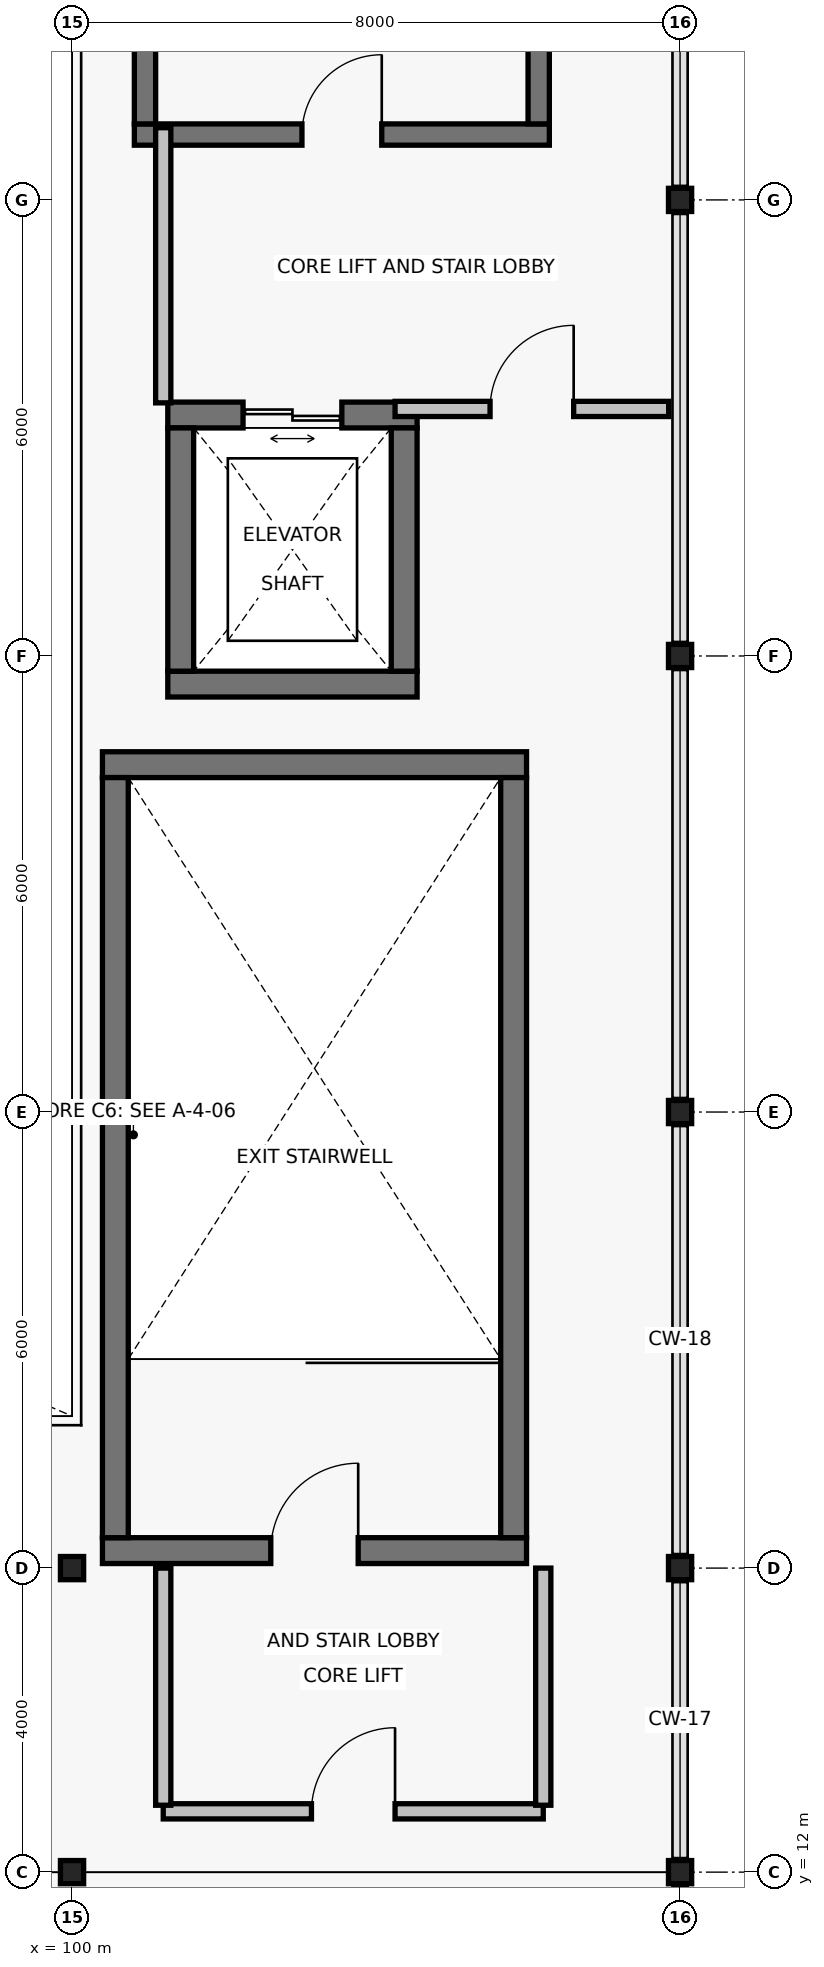
"""IFC4 building model, lengths in metres.
Left out: names, types, materials, properties, quantities, classifications, styles, units other than length and angle.
Written with IfcOpenShell. Run it as: python <this file> out.ifc"""

import sys

from ifc_helpers import new_model, si_unit, direction, frame, frame_2d, origin, origin_2d, place, context, subcontext, project, spatial, rectangle, hollow_rectangle, extrude, element, fill, save


model = new_model("IFC4")
c1 = context("Model", 3, precision=1e-05, world=origin(), true_north=direction((0.0, 1.0)))
c2 = subcontext(c1, "Body", "Model", "MODEL_VIEW")
j1 = project(units=[si_unit("LENGTHUNIT", "METRE"), si_unit("PLANEANGLEUNIT", "RADIAN")], contexts=[c1])
p1 = place(None, origin())
s1 = spatial("IfcSite", under=j1, at=p1, CompositionType="ELEMENT")
p2 = place(p1, origin())
s2 = spatial("IfcBuilding", under=s1, at=p2, CompositionType="ELEMENT")
p3 = place(p2, frame((0.0, 0.0, 6.6)))
s3 = spatial("IfcBuildingStorey", under=s2, at=p3, CompositionType="ELEMENT", Elevation=6.6)
for number, where, z_axis, x_axis in (
    (1, (100.0, 12.0, 0.0), (0.0, 0.0, 1.0), (1.0, 0.0, 0.0)),
    (2, (100.0, 16.0, 0.0), (0.0, 0.0, 1.0), (1.0, 0.0, 0.0)),
    (3, (108.0, 12.0, 0.0), (0.0, 0.0, 1.0), (1.0, 0.0, 0.0)),
    (4, (108.0, 16.0, 0.0), (0.0, 0.0, 1.0), (1.0, 0.0, 0.0)),
    (5, (108.0, 22.0, 0.0), (0.0, 0.0, 1.0), (1.0, 0.0, 0.0)),
    (6, (108.0, 28.0, 0.0), (0.0, 0.0, 1.0), (1.0, 0.0, 0.0)),
    (7, (108.0, 34.0, 0.0), (0.0, 0.0, 1.0), (1.0, 0.0, 0.0)),
):
    element("IfcColumn", number, at=place(p3, frame(where, z_axis=z_axis, x_axis=x_axis)), inside=s3, PredefinedType="COLUMN", context=c2, shape_type="SweptSolid", body=[
        extrude(hollow_rectangle(XDim=0.305, YDim=0.305, WallThickness=0.013, InnerFilletRadius=0.013, OuterFilletRadius=0.025, at=origin_2d()), origin(), (0.0, 0.0, 1.0), 4.8),
    ])
p4 = place(p3, frame((100.4, 16.23, 0.0), z_axis=(0.0, 0.0, 1.0), x_axis=(1.0, 0.0, 0.0)))
e8 = element("IfcWall", 8, at=p4, inside=s3, PredefinedType="SHEAR", context=c2, shape_type="SweptSolid", body=[
    extrude(rectangle(XDim=5.58, YDim=0.34, at=frame_2d((2.79, 0.0))), origin(), (0.0, 0.0, 1.0), 4.54),
])
p5 = place(p4, frame((2.215, 0.0, 0.0)))
e9 = element("IfcOpeningElement", 9, at=p5, cuts=e8, PredefinedType="OPENING", context=c2, shape_type="SweptSolid", body=[
    extrude(rectangle(XDim=1.15, YDim=2.15, at=frame_2d((0.575, 1.075))), frame((0.0, 0.185, 0.0), z_axis=(0.0, -1.0, 0.0), x_axis=(1.0, 0.0, 0.0)), (0.0, 0.0, 1.0), 0.37),
])
p6 = place(p3, frame((105.98, 26.57, 0.0), z_axis=(0.0, 0.0, 1.0), x_axis=(-1.0, 0.0, 0.0)))
e10 = element("IfcWall", 10, at=p6, inside=s3, PredefinedType="SHEAR", context=c2, shape_type="SweptSolid", body=[
    extrude(rectangle(XDim=5.58, YDim=0.34, at=frame_2d((2.79, 0.0))), origin(), (0.0, 0.0, 1.0), 4.54),
])
for number, where, z_axis, x_axis in (
    (11, (100.57, 26.4, 0.0), (0.0, 0.0, 1.0), (0.0, -1.0, 0.0)),
    (12, (105.81, 16.4, 0.0), (0.0, 0.0, 1.0), (0.0, 1.0, 0.0)),
):
    element("IfcWall", number, at=place(p3, frame(where, z_axis=z_axis, x_axis=x_axis)), inside=s3, PredefinedType="SHEAR", context=c2, shape_type="SweptSolid", body=[
        extrude(rectangle(XDim=10.0, YDim=0.34, at=frame_2d((5.0, 0.0))), origin(), (0.0, 0.0, 1.0), 4.54),
    ])
p7 = place(p3, frame((101.2, 12.8, 0.0), z_axis=(0.0, 0.0, 1.0), x_axis=(1.0, 0.0, 0.0)))
e13 = element("IfcWall", 13, at=p7, inside=s3, PredefinedType="PARTITIONING", context=c2, shape_type="SweptSolid", body=[
    extrude(rectangle(XDim=5.0, YDim=0.2, at=frame_2d((2.5, 0.0))), origin(), (0.0, 0.0, 1.0), 4.136),
])
p8 = place(p7, frame((1.95, 0.0, 0.0)))
e14 = element("IfcOpeningElement", 14, at=p8, cuts=e13, PredefinedType="OPENING", context=c2, shape_type="SweptSolid", body=[
    extrude(rectangle(XDim=1.1, YDim=2.15, at=frame_2d((0.55, 1.075))), frame((0.0, 0.115, 0.0), z_axis=(0.0, -1.0, 0.0), x_axis=(1.0, 0.0, 0.0)), (0.0, 0.0, 1.0), 0.23),
])
for number, where, z_axis, x_axis in (
    (15, (101.2, 16.0, 0.0), (0.0, 0.0, 1.0), (0.0, -1.0, 0.0)),
    (16, (106.2, 12.88, 0.0), (0.0, 0.0, 1.0), (0.0, 1.0, 0.0)),
):
    element("IfcWall", number, at=place(p3, frame(where, z_axis=z_axis, x_axis=x_axis)), inside=s3, PredefinedType="PARTITIONING", context=c2, shape_type="SweptSolid", body=[
        extrude(rectangle(XDim=3.12, YDim=0.2, at=frame_2d((1.56, 0.0))), origin(), (0.0, 0.0, 1.0), 3.839),
    ])
p9 = place(p3, frame((100.82, 34.86, 0.0), z_axis=(0.0, 0.0, 1.0), x_axis=(1.0, 0.0, 0.0)))
e17 = element("IfcWall", 17, at=p9, inside=s3, PredefinedType="SHEAR", context=c2, shape_type="SweptSolid", body=[
    extrude(rectangle(XDim=5.46, YDim=0.28, at=frame_2d((2.73, 0.0))), origin(), (0.0, 0.0, 1.0), 4.54),
])
p10 = place(p9, frame((2.205, 0.0, 0.0)))
e18 = element("IfcOpeningElement", 18, at=p10, cuts=e17, PredefinedType="OPENING", context=c2, shape_type="SweptSolid", body=[
    extrude(rectangle(XDim=1.05, YDim=2.15, at=frame_2d((0.525, 1.075))), frame((0.0, 0.155, 0.0), z_axis=(0.0, -1.0, 0.0), x_axis=(1.0, 0.0, 0.0)), (0.0, 0.0, 1.0), 0.31),
])
for number, where, z_axis, x_axis in (
    (19, (100.96, 45.0, 0.0), (0.0, 0.0, 1.0), (0.0, -1.0, 0.0)),
    (20, (106.14, 35.0, 0.0), (0.0, 0.0, 1.0), (0.0, 1.0, 0.0)),
):
    element("IfcWall", number, at=place(p3, frame(where, z_axis=z_axis, x_axis=x_axis)), inside=s3, PredefinedType="SHEAR", context=c2, shape_type="SweptSolid", body=[
        extrude(rectangle(XDim=10.0, YDim=0.28, at=frame_2d((5.0, 0.0))), origin(), (0.0, 0.0, 1.0), 4.54),
    ])
p11 = place(p3, frame((101.26, 27.63, 0.0), z_axis=(0.0, 0.0, 1.0), x_axis=(1.0, 0.0, 0.0)))
e21 = element("IfcWall", 21, at=p11, inside=s3, PredefinedType="SHEAR", context=c2, shape_type="SweptSolid", body=[
    extrude(rectangle(XDim=3.28, YDim=0.34, at=frame_2d((1.64, 0.0))), origin(), (0.0, 0.0, 1.0), 4.54),
])
p12 = place(p3, frame((104.54, 31.17, 0.0), z_axis=(0.0, 0.0, 1.0), x_axis=(-1.0, 0.0, 0.0)))
e22 = element("IfcWall", 22, at=p12, inside=s3, PredefinedType="SHEAR", context=c2, shape_type="SweptSolid", body=[
    extrude(rectangle(XDim=3.28, YDim=0.34, at=frame_2d((1.64, 0.0))), origin(), (0.0, 0.0, 1.0), 4.54),
])
p13 = place(p12, frame((0.99, 0.0, 0.0)))
e23 = element("IfcOpeningElement", 23, at=p13, cuts=e22, PredefinedType="OPENING", context=c2, shape_type="SweptSolid", body=[
    extrude(rectangle(XDim=1.3, YDim=2.25, at=frame_2d((0.65, 1.125))), frame((0.0, 0.185, 0.0), z_axis=(0.0, -1.0, 0.0), x_axis=(1.0, 0.0, 0.0)), (0.0, 0.0, 1.0), 0.37),
])
for number, where, z_axis, x_axis in (
    (24, (101.43, 31.0, 0.0), (0.0, 0.0, 1.0), (0.0, -1.0, 0.0)),
    (25, (104.37, 27.8, 0.0), (0.0, 0.0, 1.0), (0.0, 1.0, 0.0)),
):
    element("IfcWall", number, at=place(p3, frame(where, z_axis=z_axis, x_axis=x_axis)), inside=s3, PredefinedType="SHEAR", context=c2, shape_type="SweptSolid", body=[
        extrude(rectangle(XDim=3.2, YDim=0.34, at=frame_2d((1.6, 0.0))), origin(), (0.0, 0.0, 1.0), 4.54),
    ])
p14 = place(p3, frame((104.25, 31.25, 0.0), z_axis=(0.0, 0.0, 1.0), x_axis=(1.0, 0.0, 0.0)))
e26 = element("IfcWall", 26, at=p14, inside=s3, PredefinedType="PARTITIONING", context=c2, shape_type="SweptSolid", body=[
    extrude(rectangle(XDim=3.6, YDim=0.2, at=frame_2d((1.8, 0.0))), origin(), (0.0, 0.0, 1.0), 3.911),
])
p15 = place(p14, frame((1.25, 0.0, 0.0)))
e27 = element("IfcOpeningElement", 27, at=p15, cuts=e26, PredefinedType="OPENING", context=c2, shape_type="SweptSolid", body=[
    extrude(rectangle(XDim=1.1, YDim=2.15, at=frame_2d((0.55, 1.075))), frame((0.0, 0.115, 0.0), z_axis=(0.0, -1.0, 0.0), x_axis=(1.0, 0.0, 0.0)), (0.0, 0.0, 1.0), 0.23),
])
p16 = place(p3, frame((101.2, 34.95, 0.0), z_axis=(0.0, 0.0, 1.0), x_axis=(0.0, -1.0, 0.0)))
e28 = element("IfcWall", 28, at=p16, inside=s3, PredefinedType="PARTITIONING", context=c2, shape_type="SweptSolid", body=[
    extrude(rectangle(XDim=3.62, YDim=0.2, at=frame_2d((1.81, 0.0))), origin(), (0.0, 0.0, 1.0), 4.48),
])
p17 = place(p5, origin())
e29 = element("IfcDoor", 29, at=p17, inside=s3, OperationType="SINGLE_SWING_RIGHT", PredefinedType="DOOR", context=c2, shape_type="SweptSolid", body=[
    extrude(rectangle(XDim=1.15, YDim=2.15, at=frame_2d((0.575, 1.075))), frame((0.0, 0.025, 0.0), z_axis=(0.0, -1.0, 0.0), x_axis=(1.0, 0.0, 0.0)), (0.0, 0.0, 1.0), 0.05),
])
fill(e9, e29)
p18 = place(p8, origin())
e30 = element("IfcDoor", 30, at=p18, inside=s3, OperationType="SINGLE_SWING_RIGHT", PredefinedType="DOOR", context=c2, shape_type="SweptSolid", body=[
    extrude(rectangle(XDim=1.1, YDim=2.15, at=frame_2d((0.55, 1.075))), frame((0.0, 0.025, 0.0), z_axis=(0.0, -1.0, 0.0), x_axis=(1.0, 0.0, 0.0)), (0.0, 0.0, 1.0), 0.05),
])
fill(e14, e30)
p19 = place(p10, origin())
e31 = element("IfcDoor", 31, at=p19, inside=s3, OperationType="SINGLE_SWING_RIGHT", PredefinedType="DOOR", context=c2, shape_type="SweptSolid", body=[
    extrude(rectangle(XDim=1.05, YDim=2.15, at=frame_2d((0.525, 1.075))), frame((0.0, 0.025, 0.0), z_axis=(0.0, -1.0, 0.0), x_axis=(1.0, 0.0, 0.0)), (0.0, 0.0, 1.0), 0.05),
])
fill(e18, e31)
p20 = place(p13, origin())
e32 = element("IfcDoor", 32, at=p20, inside=s3, OperationType="DOUBLE_DOOR_SLIDING", PredefinedType="DOOR", context=c2, shape_type="SweptSolid", body=[
    extrude(rectangle(XDim=1.3, YDim=2.25, at=frame_2d((0.65, 1.125))), frame((0.0, 0.025, 0.0), z_axis=(0.0, -1.0, 0.0), x_axis=(1.0, 0.0, 0.0)), (0.0, 0.0, 1.0), 0.05),
])
fill(e23, e32)
p21 = place(p15, origin())
e33 = element("IfcDoor", 33, at=p21, inside=s3, OperationType="SINGLE_SWING_RIGHT", PredefinedType="DOOR", context=c2, shape_type="SweptSolid", body=[
    extrude(rectangle(XDim=1.1, YDim=2.15, at=frame_2d((0.55, 1.075))), frame((0.0, 0.025, 0.0), z_axis=(0.0, -1.0, 0.0), x_axis=(1.0, 0.0, 0.0)), (0.0, 0.0, 1.0), 0.05),
])
fill(e27, e33)
save(model, sys.argv[1])
